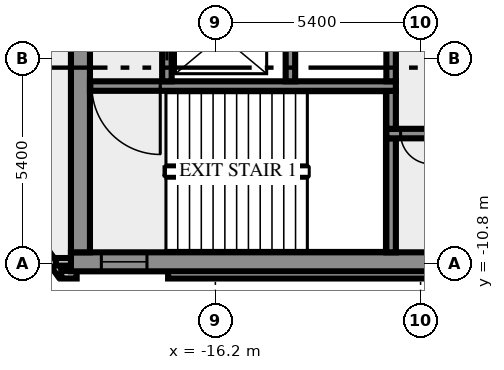
"""IFC4 building model, lengths in metres.
Left out: names, types, materials, properties, quantities, classifications, styles, units other than length and angle.
Written with IfcOpenShell. Run it as: python <this file> out.ifc"""

import sys

from ifc_helpers import new_model, si_unit, direction, frame, frame_2d, origin, place, context, subcontext, project, spatial, rectangle, extrude, element, fill, save


model = new_model("IFC4")
c1 = context("Model", 3, precision=1e-05, world=origin(), true_north=direction((0.0, 1.0)))
c2 = subcontext(c1, "Body", "Model", "MODEL_VIEW")
j1 = project(units=[si_unit("LENGTHUNIT", "METRE"), si_unit("PLANEANGLEUNIT", "RADIAN")], contexts=[c1])
p1 = place(None, origin())
s1 = spatial("IfcSite", under=j1, at=p1, CompositionType="ELEMENT")
p2 = place(p1, origin())
s2 = spatial("IfcBuilding", under=s1, at=p2, CompositionType="ELEMENT")
p3 = place(p2, frame((0.0, 0.0, 335.0)))
s3 = spatial("IfcBuildingStorey", under=s2, at=p3, CompositionType="ELEMENT", Elevation=335.0)
p4 = place(p3, frame((-21.833, -8.909, 0.0), z_axis=(0.0, 0.0, 1.0), x_axis=(0.587766567315, -0.809030569476, 0.0)))
e1 = element("IfcWall", 1, at=p4, inside=s3, PredefinedType="SOLIDWALL", context=c2, shape_type="SweptSolid", body=[
    extrude(rectangle(XDim=2.688, YDim=0.2, at=frame_2d((1.344, 0.0))), origin(), (0.0, 0.0, 1.0), 3.65),
])
p5 = place(p3, frame((-20.256, -11.088, 0.0), z_axis=(0.0, 0.0, 1.0), x_axis=(1.0, 0.0, 0.0)))
e2 = element("IfcWall", 2, at=p5, inside=s3, PredefinedType="SOLIDWALL", context=c2, shape_type="SweptSolid", body=[
    extrude(rectangle(XDim=0.406, YDim=0.2, at=frame_2d((0.203, 0.0))), origin(), (0.0, 0.0, 1.0), 3.65),
])
p6 = place(p3, frame((-17.444, -11.088, 0.0), z_axis=(0.0, 0.0, 1.0), x_axis=(1.0, 0.0, 0.0)))
e3 = element("IfcWall", 3, at=p6, inside=s3, PredefinedType="SOLIDWALL", context=c2, shape_type="SweptSolid", body=[
    extrude(rectangle(XDim=34.888, YDim=0.2, at=frame_2d((17.444, 0.0))), origin(), (0.0, 0.0, 1.0), 3.65),
])
p7 = place(p3, frame((-19.98, -10.75, 0.0), z_axis=(0.0, 0.0, 1.0), x_axis=(-1.0, 0.0, 0.0)))
e4 = element("IfcWall", 4, at=p7, inside=s3, PredefinedType="SOLIDWALL", context=c2, shape_type="SweptSolid", body=[
    extrude(rectangle(XDim=0.417, YDim=0.2, at=frame_2d((0.208, 0.0))), origin(), (0.0, 0.0, 1.0), 3.65),
])
p8 = place(p3, frame((-20.0, -10.75, 0.0), z_axis=(0.0, 0.0, 1.0), x_axis=(1.0, 0.0, 0.0)))
e5 = element("IfcWall", 5, at=p8, inside=s3, PredefinedType="SHEAR", context=c2, shape_type="SweptSolid", body=[
    extrude(rectangle(XDim=40.0, YDim=0.5, at=frame_2d((20.0, 0.0))), origin(), (0.0, 0.0, 1.0), 3.65),
])
p9 = place(p8, frame((0.8, 0.0, 1.0)))
e6 = element("IfcOpeningElement", 6, at=p9, cuts=e5, PredefinedType="OPENING", context=c2, shape_type="SweptSolid", body=[
    extrude(rectangle(XDim=1.2, YDim=1.2, at=frame_2d((0.6, 0.6))), frame((0.0, 0.26, 0.0), z_axis=(0.0, -1.0, 0.0), x_axis=(1.0, 0.0, 0.0)), (0.0, 0.0, 1.0), 0.52),
])
p10 = place(p8, frame((38.0, 0.0, 1.0)))
e7 = element("IfcOpeningElement", 7, at=p10, cuts=e5, PredefinedType="OPENING", context=c2, shape_type="SweptSolid", body=[
    extrude(rectangle(XDim=1.2, YDim=1.2, at=frame_2d((0.6, 0.6))), frame((0.0, 0.26, 0.0), z_axis=(0.0, -1.0, 0.0), x_axis=(1.0, 0.0, 0.0)), (0.0, 0.0, 1.0), 0.52),
])
p11 = place(p3, frame((-19.75, -10.5, 0.0), z_axis=(0.0, 0.0, 1.0), x_axis=(0.0, 1.0, 0.0)))
e8 = element("IfcWall", 8, at=p11, inside=s3, PredefinedType="SHEAR", context=c2, shape_type="SweptSolid", body=[
    extrude(rectangle(XDim=8.8, YDim=0.5, at=frame_2d((4.4, 0.0))), origin(), (0.0, 0.0, 1.0), 3.65),
])
p12 = place(p3, frame((-11.575, -10.5, 0.0), z_axis=(0.0, 0.0, 1.0), x_axis=(0.0, 1.0, 0.0)))
e9 = element("IfcWall", 9, at=p12, inside=s3, PredefinedType="SHEAR", context=c2, shape_type="SweptSolid", body=[
    extrude(rectangle(XDim=3.0, YDim=0.25, at=frame_2d((1.5, 0.0))), origin(), (0.0, 0.0, 1.0), 3.65),
])
p13 = place(p3, frame((11.7, -7.375, 0.0), z_axis=(0.0, 0.0, 1.0), x_axis=(-1.0, 0.0, 0.0)))
e10 = element("IfcWall", 10, at=p13, inside=s3, PredefinedType="SHEAR", context=c2, shape_type="SweptSolid", body=[
    extrude(rectangle(XDim=23.4, YDim=0.25, at=frame_2d((11.7, 0.0))), origin(), (0.0, 0.0, 1.0), 3.65),
])
p14 = place(p13, frame((22.225, 0.0, 0.0)))
e11 = element("IfcOpeningElement", 11, at=p14, cuts=e10, PredefinedType="OPENING", context=c2, shape_type="SweptSolid", body=[
    extrude(rectangle(XDim=0.8, YDim=2.1, at=frame_2d((0.4, 1.05))), frame((0.0, 0.135, 0.0), z_axis=(0.0, -1.0, 0.0), x_axis=(1.0, 0.0, 0.0)), (0.0, 0.0, 1.0), 0.27),
])
p15 = place(p13, frame((20.2, 0.0, 0.0)))
e12 = element("IfcOpeningElement", 12, at=p15, cuts=e10, PredefinedType="OPENING", context=c2, shape_type="SweptSolid", body=[
    extrude(rectangle(XDim=1.1, YDim=2.1, at=frame_2d((0.55, 1.05))), frame((0.0, 0.135, 0.0), z_axis=(0.0, -1.0, 0.0), x_axis=(1.0, 0.0, 0.0)), (0.0, 0.0, 1.0), 0.27),
])
p16 = place(p13, frame((17.7, 0.0, 0.0)))
e13 = element("IfcOpeningElement", 13, at=p16, cuts=e10, PredefinedType="OPENING", context=c2, shape_type="SweptSolid", body=[
    extrude(rectangle(XDim=1.1, YDim=2.1, at=frame_2d((0.55, 1.05))), frame((0.0, 0.135, 0.0), z_axis=(0.0, -1.0, 0.0), x_axis=(1.0, 0.0, 0.0)), (0.0, 0.0, 1.0), 0.27),
])
p17 = place(p13, frame((15.975, 0.0, 0.0)))
e14 = element("IfcOpeningElement", 14, at=p17, cuts=e10, PredefinedType="OPENING", context=c2, shape_type="SweptSolid", body=[
    extrude(rectangle(XDim=0.8, YDim=2.1, at=frame_2d((0.4, 1.05))), frame((0.0, 0.135, 0.0), z_axis=(0.0, -1.0, 0.0), x_axis=(1.0, 0.0, 0.0)), (0.0, 0.0, 1.0), 0.27),
])
p18 = place(p13, frame((14.2, 0.0, 0.0)))
e15 = element("IfcOpeningElement", 15, at=p18, cuts=e10, PredefinedType="OPENING", context=c2, shape_type="SweptSolid", body=[
    extrude(rectangle(XDim=0.9, YDim=2.1, at=frame_2d((0.45, 1.05))), frame((0.0, 0.135, 0.0), z_axis=(0.0, -1.0, 0.0), x_axis=(1.0, 0.0, 0.0)), (0.0, 0.0, 1.0), 0.27),
])
p19 = place(p13, frame((12.35, 0.0, 0.0)))
e16 = element("IfcOpeningElement", 16, at=p19, cuts=e10, PredefinedType="OPENING", context=c2, shape_type="SweptSolid", body=[
    extrude(rectangle(XDim=0.9, YDim=2.1, at=frame_2d((0.45, 1.05))), frame((0.0, 0.135, 0.0), z_axis=(0.0, -1.0, 0.0), x_axis=(1.0, 0.0, 0.0)), (0.0, 0.0, 1.0), 0.27),
])
p20 = place(p13, frame((10.65, 0.0, 0.0)))
e17 = element("IfcOpeningElement", 17, at=p20, cuts=e10, PredefinedType="OPENING", context=c2, shape_type="SweptSolid", body=[
    extrude(rectangle(XDim=0.9, YDim=2.1, at=frame_2d((0.45, 1.05))), frame((0.0, 0.135, 0.0), z_axis=(0.0, -1.0, 0.0), x_axis=(1.0, 0.0, 0.0)), (0.0, 0.0, 1.0), 0.27),
])
p21 = place(p13, frame((7.713, 0.0, 0.0)))
e18 = element("IfcOpeningElement", 18, at=p21, cuts=e10, PredefinedType="OPENING", context=c2, shape_type="SweptSolid", body=[
    extrude(rectangle(XDim=0.9, YDim=2.1, at=frame_2d((0.45, 1.05))), frame((0.0, 0.135, 0.0), z_axis=(0.0, -1.0, 0.0), x_axis=(1.0, 0.0, 0.0)), (0.0, 0.0, 1.0), 0.27),
])
p22 = place(p13, frame((4.15, 0.0, 0.0)))
e19 = element("IfcOpeningElement", 19, at=p22, cuts=e10, PredefinedType="OPENING", context=c2, shape_type="SweptSolid", body=[
    extrude(rectangle(XDim=0.9, YDim=2.1, at=frame_2d((0.45, 1.05))), frame((0.0, 0.135, 0.0), z_axis=(0.0, -1.0, 0.0), x_axis=(1.0, 0.0, 0.0)), (0.0, 0.0, 1.0), 0.27),
])
p23 = place(p13, frame((1.138, 0.0, 0.0)))
e20 = element("IfcOpeningElement", 20, at=p23, cuts=e10, PredefinedType="OPENING", context=c2, shape_type="SweptSolid", body=[
    extrude(rectangle(XDim=0.9, YDim=2.1, at=frame_2d((0.45, 1.05))), frame((0.0, 0.135, 0.0), z_axis=(0.0, -1.0, 0.0), x_axis=(1.0, 0.0, 0.0)), (0.0, 0.0, 1.0), 0.27),
])
p24 = place(p3, frame((-11.575, -7.25, 0.0), z_axis=(0.0, 0.0, 1.0), x_axis=(0.0, 1.0, 0.0)))
e21 = element("IfcWall", 21, at=p24, inside=s3, PredefinedType="SHEAR", context=c2, shape_type="SweptSolid", body=[
    extrude(rectangle(XDim=1.0, YDim=0.25, at=frame_2d((0.5, 0.0))), origin(), (0.0, 0.0, 1.0), 3.65),
])
p25 = place(p3, frame((-11.45, -6.125, 0.0), z_axis=(0.0, 0.0, 1.0), x_axis=(-1.0, 0.0, 0.0)))
e22 = element("IfcWall", 22, at=p25, inside=s3, PredefinedType="SHEAR", context=c2, shape_type="SweptSolid", body=[
    extrude(rectangle(XDim=8.05, YDim=0.25, at=frame_2d((4.025, 0.0))), origin(), (0.0, 0.0, 1.0), 3.65),
])
p26 = place(p25, frame((6.2, 0.0, 0.0)))
e23 = element("IfcOpeningElement", 23, at=p26, cuts=e22, PredefinedType="OPENING", context=c2, shape_type="SweptSolid", body=[
    extrude(rectangle(XDim=1.8, YDim=2.1, at=frame_2d((0.9, 1.05))), frame((0.0, 0.135, 0.0), z_axis=(0.0, -1.0, 0.0), x_axis=(1.0, 0.0, 0.0)), (0.0, 0.0, 1.0), 0.27),
])
p27 = place(p3, frame((-17.475, -6.0, 0.0), z_axis=(0.0, 0.0, 1.0), x_axis=(0.0, 1.0, 0.0)))
e24 = element("IfcWall", 24, at=p27, inside=s3, PredefinedType="SHEAR", context=c2, shape_type="SweptSolid", body=[
    extrude(rectangle(XDim=4.3, YDim=0.25, at=frame_2d((2.15, 0.0))), origin(), (0.0, 0.0, 1.0), 3.65),
])
p28 = place(p27, frame((0.55, 0.0, 0.0)))
e25 = element("IfcOpeningElement", 25, at=p28, cuts=e24, PredefinedType="OPENING", context=c2, shape_type="SweptSolid", body=[
    extrude(rectangle(XDim=1.3, YDim=2.1, at=frame_2d((0.65, 1.05))), frame((0.0, 0.135, 0.0), z_axis=(0.0, -1.0, 0.0), x_axis=(1.0, 0.0, 0.0)), (0.0, 0.0, 1.0), 0.27),
])
p29 = place(p3, frame((-14.225, -6.0, 0.0), z_axis=(0.0, 0.0, 1.0), x_axis=(0.0, 1.0, 0.0)))
e26 = element("IfcWall", 26, at=p29, inside=s3, PredefinedType="SHEAR", context=c2, shape_type="SweptSolid", body=[
    extrude(rectangle(XDim=4.3, YDim=0.25, at=frame_2d((2.15, 0.0))), origin(), (0.0, 0.0, 1.0), 3.65),
])
p30 = place(p3, frame((-11.575, -6.0, 0.0), z_axis=(0.0, 0.0, 1.0), x_axis=(0.0, 1.0, 0.0)))
e27 = element("IfcWall", 27, at=p30, inside=s3, PredefinedType="SHEAR", context=c2, shape_type="SweptSolid", body=[
    extrude(rectangle(XDim=1.75, YDim=0.25, at=frame_2d((0.875, 0.0))), origin(), (0.0, 0.0, 1.0), 3.65),
])
p31 = place(p9, origin())
e28 = element("IfcWindow", 28, at=p31, inside=s3, PartitioningType="SINGLE_PANEL", PredefinedType="WINDOW", context=c2, shape_type="SweptSolid", body=[
    extrude(rectangle(XDim=1.2, YDim=1.2, at=frame_2d((0.6, 0.6))), frame((0.0, 0.03, 0.0), z_axis=(0.0, -1.0, 0.0), x_axis=(1.0, 0.0, 0.0)), (0.0, 0.0, 1.0), 0.06),
])
fill(e6, e28)
p32 = place(p14, origin())
e29 = element("IfcDoor", 29, at=p32, inside=s3, OperationType="SINGLE_SWING_RIGHT", PredefinedType="DOOR", context=c2, shape_type="SweptSolid", body=[
    extrude(rectangle(XDim=0.8, YDim=2.1, at=frame_2d((0.4, 1.05))), frame((0.0, 0.025, 0.0), z_axis=(0.0, -1.0, 0.0), x_axis=(1.0, 0.0, 0.0)), (0.0, 0.0, 1.0), 0.05),
])
fill(e11, e29)
p33 = place(p26, origin())
e30 = element("IfcDoor", 30, at=p33, inside=s3, OperationType="DOUBLE_DOOR_SINGLE_SWING", PredefinedType="DOOR", context=c2, shape_type="SweptSolid", body=[
    extrude(rectangle(XDim=1.8, YDim=2.1, at=frame_2d((0.9, 1.05))), frame((0.0, 0.025, 0.0), z_axis=(0.0, -1.0, 0.0), x_axis=(1.0, 0.0, 0.0)), (0.0, 0.0, 1.0), 0.05),
])
fill(e23, e30)
p34 = place(p28, origin())
e31 = element("IfcDoor", 31, at=p34, inside=s3, OperationType="DOUBLE_DOOR_SLIDING", PredefinedType="DOOR", context=c2, shape_type="SweptSolid", body=[
    extrude(rectangle(XDim=1.3, YDim=2.1, at=frame_2d((0.65, 1.05))), frame((0.0, 0.025, 0.0), z_axis=(0.0, -1.0, 0.0), x_axis=(1.0, 0.0, 0.0)), (0.0, 0.0, 1.0), 0.05),
])
fill(e25, e31)
save(model, sys.argv[1])
